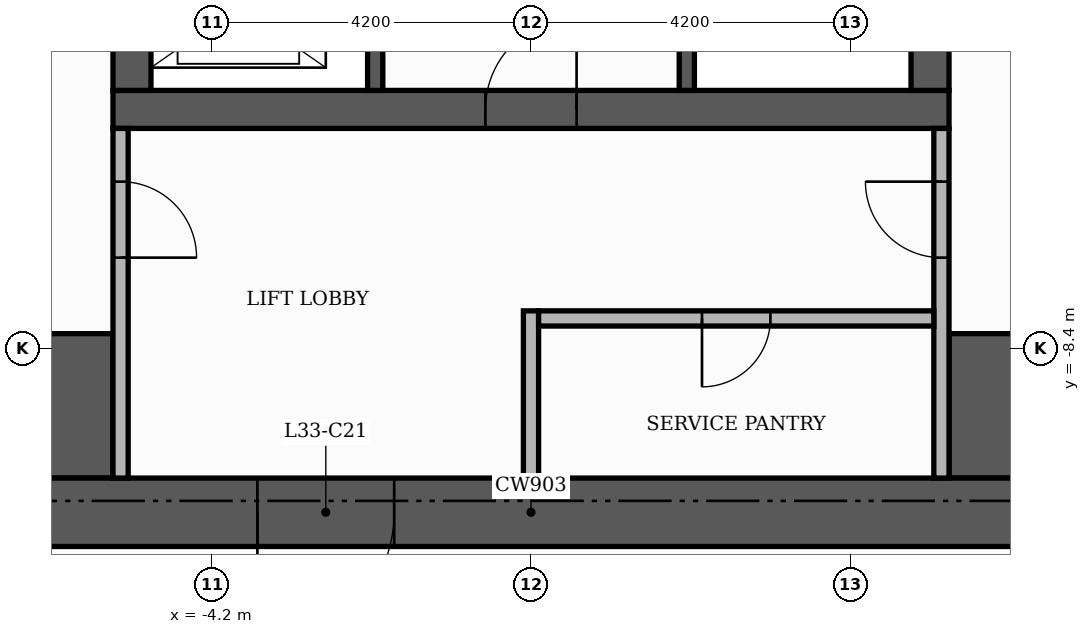
"""IFC4 building model, lengths in metres.
Left out: names, types, materials, properties, quantities, classifications, styles, units other than length and angle.
Written with IfcOpenShell. Run it as: python <this file> out.ifc"""

import sys

from ifc_helpers import new_model, si_unit, direction, frame, frame_2d, origin, place, context, subcontext, project, spatial, rectangle, extrude, element, fill, save


model = new_model("IFC4")
c1 = context("Model", 3, precision=1e-05, world=origin(), true_north=direction((0.0, 1.0)))
c2 = subcontext(c1, "Body", "Model", "MODEL_VIEW")
j1 = project(units=[si_unit("LENGTHUNIT", "METRE"), si_unit("PLANEANGLEUNIT", "RADIAN")], contexts=[c1])
p1 = place(None, origin())
s1 = spatial("IfcSite", under=j1, at=p1, CompositionType="ELEMENT")
p2 = place(p1, origin())
s2 = spatial("IfcBuilding", under=s1, at=p2, CompositionType="ELEMENT")
p3 = place(p2, frame((0.0, 0.0, 141.6)))
s3 = spatial("IfcBuildingStorey", under=s2, at=p3, CompositionType="ELEMENT", Elevation=141.6)
p4 = place(p3, frame((-5.5, -5.25, 0.0), z_axis=(0.0, 0.0, 1.0), x_axis=(1.0, 0.0, 0.0)))
e1 = element("IfcWall", 1, at=p4, inside=s3, PredefinedType="SHEAR", context=c2, shape_type="SweptSolid", body=[
    extrude(rectangle(XDim=11.0, YDim=0.5, at=frame_2d((5.5, 0.0))), origin(), (0.0, 0.0, 1.0), 3.48),
])
p5 = place(p4, frame((4.9, 0.0, 0.0)))
e2 = element("IfcOpeningElement", 2, at=p5, cuts=e1, PredefinedType="OPENING", context=c2, shape_type="SweptSolid", body=[
    extrude(rectangle(XDim=1.2, YDim=2.1, at=frame_2d((0.6, 1.05))), frame((0.0, 0.26, 0.0), z_axis=(0.0, -1.0, 0.0), x_axis=(1.0, 0.0, 0.0)), (0.0, 0.0, 1.0), 0.52),
])
for number, where, z_axis, x_axis in (
    (3, (-5.25, -5.0, 0.0), (0.0, 0.0, 1.0), (0.0, 1.0, 0.0)),
    (4, (5.25, -5.0, 0.0), (0.0, 0.0, 1.0), (0.0, 1.0, 0.0)),
):
    element("IfcWall", number, at=place(p3, frame(where, z_axis=z_axis, x_axis=x_axis)), inside=s3, PredefinedType="SHEAR", context=c2, shape_type="SweptSolid", body=[
        extrude(rectangle(XDim=10.5, YDim=0.5, at=frame_2d((5.25, 0.0))), origin(), (0.0, 0.0, 1.0), 3.48),
    ])
for number, where, z_axis, x_axis in (
    (5, (-10.1, -9.15, 0.0), (0.0, 0.0, 1.0), (1.0, 0.0, 0.0)),
    (6, (5.5, -9.15, 0.0), (0.0, 0.0, 1.0), (1.0, 0.0, 0.0)),
):
    element("IfcWall", number, at=place(p3, frame(where, z_axis=z_axis, x_axis=x_axis)), inside=s3, PredefinedType="SHEAR", context=c2, shape_type="SweptSolid", body=[
        extrude(rectangle(XDim=4.6, YDim=1.9, at=frame_2d((2.3, 0.0))), origin(), (0.0, 0.0, 1.0), 3.48),
    ])
p6 = place(p3, frame((2.05, -5.0, 0.0), z_axis=(0.0, 0.0, 1.0), x_axis=(0.0, 1.0, 0.0)))
e7 = element("IfcWall", 7, at=p6, inside=s3, PredefinedType="SHEAR", context=c2, shape_type="SweptSolid", body=[
    extrude(rectangle(XDim=6.6, YDim=0.2, at=frame_2d((3.3, 0.0))), origin(), (0.0, 0.0, 1.0), 3.48),
])
p7 = place(p6, frame((5.25, 0.0, 0.0)))
e8 = element("IfcOpeningElement", 8, at=p7, cuts=e7, PredefinedType="OPENING", context=c2, shape_type="SweptSolid", body=[
    extrude(rectangle(XDim=1.0, YDim=2.1, at=frame_2d((0.5, 1.05))), frame((0.0, 0.11, 0.0), z_axis=(0.0, -1.0, 0.0), x_axis=(1.0, 0.0, 0.0)), (0.0, 0.0, 1.0), 0.22),
])
p8 = place(p3, frame((-2.05, -5.0, 0.0), z_axis=(0.0, 0.0, 1.0), x_axis=(0.0, 1.0, 0.0)))
e9 = element("IfcWall", 9, at=p8, inside=s3, PredefinedType="SHEAR", context=c2, shape_type="SweptSolid", body=[
    extrude(rectangle(XDim=3.4, YDim=0.2, at=frame_2d((1.7, 0.0))), origin(), (0.0, 0.0, 1.0), 3.48),
])
p9 = place(p8, frame((0.55, 0.0, 0.0)))
e10 = element("IfcOpeningElement", 10, at=p9, cuts=e9, PredefinedType="OPENING", context=c2, shape_type="SweptSolid", body=[
    extrude(rectangle(XDim=1.1, YDim=2.1, at=frame_2d((0.55, 1.05))), frame((0.0, 0.11, 0.0), z_axis=(0.0, -1.0, 0.0), x_axis=(1.0, 0.0, 0.0)), (0.0, 0.0, 1.0), 0.22),
])
p10 = place(p8, frame((2.45, 0.0, 0.0)))
e11 = element("IfcOpeningElement", 11, at=p10, cuts=e9, PredefinedType="OPENING", context=c2, shape_type="SweptSolid", body=[
    extrude(rectangle(XDim=0.8, YDim=2.1, at=frame_2d((0.4, 1.05))), frame((0.0, 0.11, 0.0), z_axis=(0.0, -1.0, 0.0), x_axis=(1.0, 0.0, 0.0)), (0.0, 0.0, 1.0), 0.22),
])
p11 = place(p3, frame((-11.0, -10.55, 0.0), z_axis=(0.0, 0.0, 1.0), x_axis=(1.0, 0.0, 0.0)))
e12 = element("IfcWall", 12, at=p11, inside=s3, PredefinedType="SHEAR", context=c2, shape_type="SweptSolid", body=[
    extrude(rectangle(XDim=22.0, YDim=0.9, at=frame_2d((11.0, 0.0))), origin(), (0.0, 0.0, 1.0), 3.48),
])
p12 = place(p11, frame((7.4, 0.0, 0.0)))
e13 = element("IfcOpeningElement", 13, at=p12, cuts=e12, PredefinedType="OPENING", context=c2, shape_type="SweptSolid", body=[
    extrude(rectangle(XDim=1.8, YDim=2.2, at=frame_2d((0.9, 1.1))), frame((0.0, 0.46, 0.0), z_axis=(0.0, -1.0, 0.0), x_axis=(1.0, 0.0, 0.0)), (0.0, 0.0, 1.0), 0.92),
])
p13 = place(p3, frame((-5.4, -10.1, 0.0), z_axis=(0.0, 0.0, 1.0), x_axis=(0.0, 1.0, 0.0)))
e14 = element("IfcWall", 14, at=p13, inside=s3, PredefinedType="PARTITIONING", context=c2, shape_type="SweptSolid", body=[
    extrude(rectangle(XDim=4.6, YDim=0.2, at=frame_2d((2.3, 0.0))), origin(), (0.0, 0.0, 1.0), 3.48),
])
p14 = place(p13, frame((2.9, 0.0, 0.0)))
e15 = element("IfcOpeningElement", 15, at=p14, cuts=e14, PredefinedType="OPENING", context=c2, shape_type="SweptSolid", body=[
    extrude(rectangle(XDim=1.0, YDim=2.1, at=frame_2d((0.5, 1.05))), frame((0.0, 0.11, 0.0), z_axis=(0.0, -1.0, 0.0), x_axis=(1.0, 0.0, 0.0)), (0.0, 0.0, 1.0), 0.22),
])
p15 = place(p3, frame((0.0, -10.1, 0.0), z_axis=(0.0, 0.0, 1.0), x_axis=(0.0, 1.0, 0.0)))
e16 = element("IfcWall", 16, at=p15, inside=s3, PredefinedType="PARTITIONING", context=c2, shape_type="SweptSolid", body=[
    extrude(rectangle(XDim=2.2, YDim=0.2, at=frame_2d((1.1, 0.0))), origin(), (0.0, 0.0, 1.0), 3.48),
])
p16 = place(p3, frame((5.4, -10.1, 0.0), z_axis=(0.0, 0.0, 1.0), x_axis=(0.0, 1.0, 0.0)))
e17 = element("IfcWall", 17, at=p16, inside=s3, PredefinedType="PARTITIONING", context=c2, shape_type="SweptSolid", body=[
    extrude(rectangle(XDim=4.6, YDim=0.2, at=frame_2d((2.3, 0.0))), origin(), (0.0, 0.0, 1.0), 3.48),
])
p17 = place(p16, frame((2.9, 0.0, 0.0)))
e18 = element("IfcOpeningElement", 18, at=p17, cuts=e17, PredefinedType="OPENING", context=c2, shape_type="SweptSolid", body=[
    extrude(rectangle(XDim=1.0, YDim=2.1, at=frame_2d((0.5, 1.05))), frame((0.0, 0.11, 0.0), z_axis=(0.0, -1.0, 0.0), x_axis=(1.0, 0.0, 0.0)), (0.0, 0.0, 1.0), 0.22),
])
p18 = place(p3, frame((0.1, -8.0, 0.0), z_axis=(0.0, 0.0, 1.0), x_axis=(1.0, 0.0, 0.0)))
e19 = element("IfcWall", 19, at=p18, inside=s3, PredefinedType="PARTITIONING", context=c2, shape_type="SweptSolid", body=[
    extrude(rectangle(XDim=5.2, YDim=0.2, at=frame_2d((2.6, 0.0))), origin(), (0.0, 0.0, 1.0), 3.48),
])
p19 = place(p18, frame((2.15, 0.0, 0.0)))
e20 = element("IfcOpeningElement", 20, at=p19, cuts=e19, PredefinedType="OPENING", context=c2, shape_type="SweptSolid", body=[
    extrude(rectangle(XDim=0.9, YDim=2.1, at=frame_2d((0.45, 1.05))), frame((0.0, 0.11, 0.0), z_axis=(0.0, -1.0, 0.0), x_axis=(1.0, 0.0, 0.0)), (0.0, 0.0, 1.0), 0.22),
])
p20 = place(p5, origin())
e21 = element("IfcDoor", 21, at=p20, inside=s3, OperationType="SINGLE_SWING_RIGHT", PredefinedType="DOOR", context=c2, shape_type="SweptSolid", body=[
    extrude(rectangle(XDim=1.2, YDim=2.1, at=frame_2d((0.6, 1.05))), frame((0.0, 0.025, 0.0), z_axis=(0.0, -1.0, 0.0), x_axis=(1.0, 0.0, 0.0)), (0.0, 0.0, 1.0), 0.05),
])
fill(e2, e21)
p21 = place(p14, frame((1.0, 0.0, 0.0), z_axis=(0.0, 0.0, 1.0), x_axis=(-1.0, 0.0, 0.0)))
e22 = element("IfcDoor", 22, at=p21, inside=s3, OperationType="SINGLE_SWING_LEFT", PredefinedType="DOOR", context=c2, shape_type="SweptSolid", body=[
    extrude(rectangle(XDim=1.0, YDim=2.1, at=frame_2d((0.5, 1.05))), frame((0.0, 0.025, 0.0), z_axis=(0.0, -1.0, 0.0), x_axis=(1.0, 0.0, 0.0)), (0.0, 0.0, 1.0), 0.05),
])
fill(e15, e22)
p22 = place(p17, origin())
e23 = element("IfcDoor", 23, at=p22, inside=s3, OperationType="SINGLE_SWING_RIGHT", PredefinedType="DOOR", context=c2, shape_type="SweptSolid", body=[
    extrude(rectangle(XDim=1.0, YDim=2.1, at=frame_2d((0.5, 1.05))), frame((0.0, 0.025, 0.0), z_axis=(0.0, -1.0, 0.0), x_axis=(1.0, 0.0, 0.0)), (0.0, 0.0, 1.0), 0.05),
])
fill(e18, e23)
p23 = place(p12, frame((1.8, 0.0, 0.0), z_axis=(0.0, 0.0, 1.0), x_axis=(-1.0, 0.0, 0.0)))
e24 = element("IfcDoor", 24, at=p23, inside=s3, OperationType="DOUBLE_DOOR_SINGLE_SWING", PredefinedType="DOOR", context=c2, shape_type="SweptSolid", body=[
    extrude(rectangle(XDim=1.8, YDim=2.2, at=frame_2d((0.9, 1.1))), frame((0.0, 0.025, 0.0), z_axis=(0.0, -1.0, 0.0), x_axis=(1.0, 0.0, 0.0)), (0.0, 0.0, 1.0), 0.05),
])
fill(e13, e24)
p24 = place(p19, frame((0.9, 0.0, 0.0), z_axis=(0.0, 0.0, 1.0), x_axis=(-1.0, 0.0, 0.0)))
e25 = element("IfcDoor", 25, at=p24, inside=s3, OperationType="SINGLE_SWING_LEFT", PredefinedType="DOOR", context=c2, shape_type="SweptSolid", body=[
    extrude(rectangle(XDim=0.9, YDim=2.1, at=frame_2d((0.45, 1.05))), frame((0.0, 0.025, 0.0), z_axis=(0.0, -1.0, 0.0), x_axis=(1.0, 0.0, 0.0)), (0.0, 0.0, 1.0), 0.05),
])
fill(e20, e25)
save(model, sys.argv[1])
